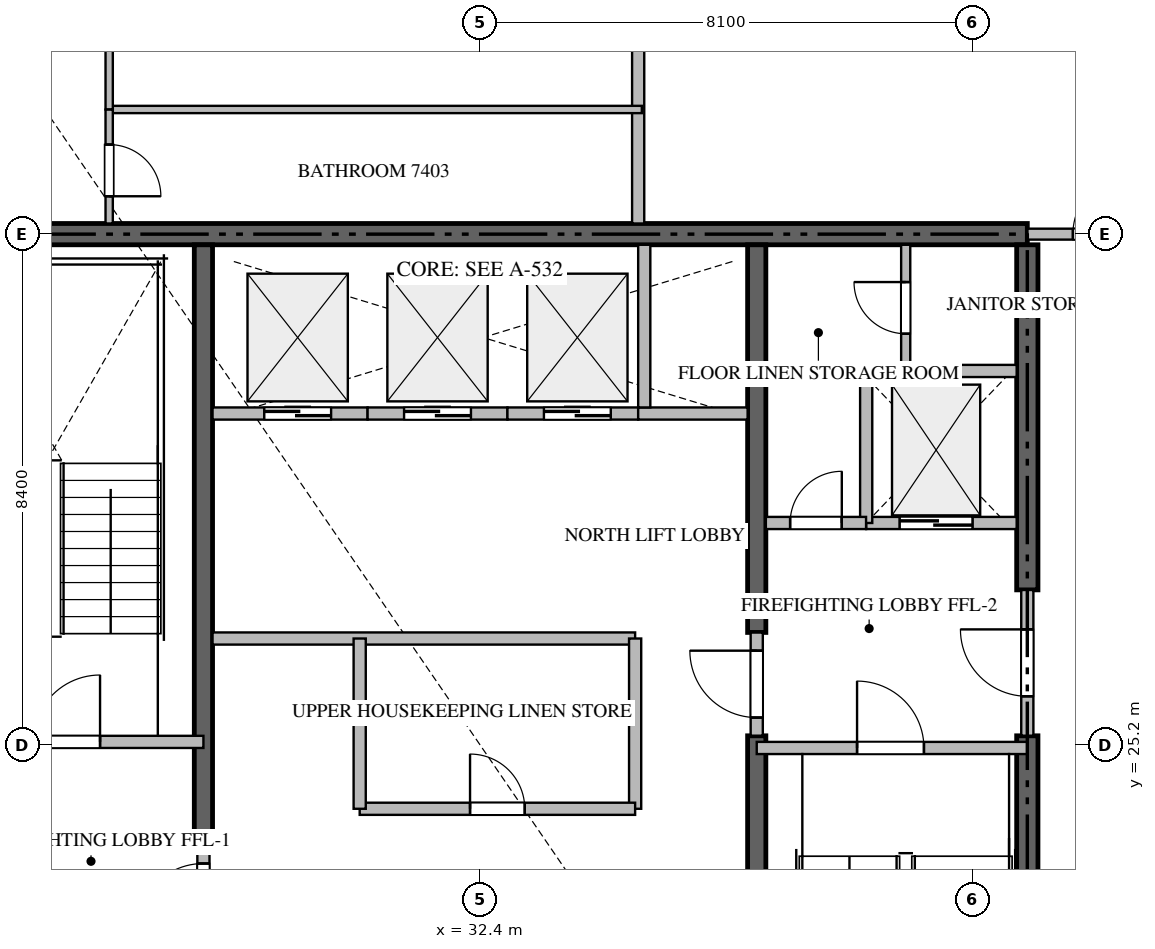
"""IFC4 building model, lengths in metres.
Left out: names, types, materials, properties, quantities, classifications, styles, units other than length and angle.
Written with IfcOpenShell. Run it as: python <this file> out.ifc"""

import sys

from ifc_helpers import new_model, si_unit, direction, frame, frame_2d, origin, place, context, subcontext, project, spatial, rectangle, extrude, source, transform, mapped, element, fill, save


model = new_model("IFC4")
c1 = context("Model", 3, precision=1e-05, world=origin(), true_north=direction((0.0, 1.0)))
c2 = subcontext(c1, "Body", "Model", "MODEL_VIEW")
j1 = project(units=[si_unit("LENGTHUNIT", "METRE"), si_unit("PLANEANGLEUNIT", "RADIAN")], contexts=[c1])
p1 = place(None, origin())
s1 = spatial("IfcSite", under=j1, at=p1, CompositionType="ELEMENT")
p2 = place(p1, origin())
s2 = spatial("IfcBuilding", under=s1, at=p2, CompositionType="ELEMENT")
p3 = place(p2, frame((0.0, 0.0, 297.5)))
s3 = spatial("IfcBuildingStorey", under=s2, at=p3, CompositionType="ELEMENT", Elevation=297.5)
p4 = place(p3, frame((41.4, 33.6, -0.26), z_axis=(0.0, 0.0, 1.0), x_axis=(-1.0, 0.0, 0.0)))
e1 = element("IfcWall", 1, at=p4, inside=s3, PredefinedType="SHEAR", context=c2, shape_type="SweptSolid", body=[
    extrude(rectangle(XDim=18.0, YDim=0.35, at=frame_2d((9.0, 0.0))), origin(), (0.0, 0.0, 1.0), 4.048),
])
p5 = place(p3, frame((41.4, 16.975, -0.26), z_axis=(0.0, 0.0, 1.0), x_axis=(0.0, 1.0, 0.0)))
e2 = element("IfcWall", 2, at=p5, inside=s3, PredefinedType="SHEAR", context=c2, shape_type="SweptSolid", body=[
    extrude(rectangle(XDim=8.375, YDim=0.35, at=frame_2d((4.188, 0.0))), origin(), (0.0, 0.0, 1.0), 4.048),
])
p6 = place(p3, frame((41.4, 27.75, -0.26), z_axis=(0.0, 0.0, 1.0), x_axis=(0.0, 1.0, 0.0)))
e3 = element("IfcWall", 3, at=p6, inside=s3, PredefinedType="SHEAR", context=c2, shape_type="SweptSolid", body=[
    extrude(rectangle(XDim=5.675, YDim=0.35, at=frame_2d((2.837, 0.0))), origin(), (0.0, 0.0, 1.0), 4.048),
])
p7 = place(p3, frame((27.85, 23.55, -0.26), z_axis=(0.0, 0.0, 1.0), x_axis=(0.0, 1.0, 0.0)))
e4 = element("IfcWall", 4, at=p7, inside=s3, PredefinedType="SHEAR", context=c2, shape_type="SweptSolid", body=[
    extrude(rectangle(XDim=9.875, YDim=0.3, at=frame_2d((4.938, 0.0))), origin(), (0.0, 0.0, 1.0), 4.048),
])
p8 = place(p3, frame((36.95, 16.975, -0.26), z_axis=(0.0, 0.0, 1.0), x_axis=(0.0, 1.0, 0.0)))
e5 = element("IfcWall", 5, at=p8, inside=s3, PredefinedType="SHEAR", context=c2, shape_type="SweptSolid", body=[
    extrude(rectangle(XDim=8.375, YDim=0.3, at=frame_2d((4.188, 0.0))), origin(), (0.0, 0.0, 1.0), 4.048),
])
p9 = place(p3, frame((36.95, 27.05, -0.26), z_axis=(0.0, 0.0, 1.0), x_axis=(0.0, 1.0, 0.0)))
e6 = element("IfcWall", 6, at=p9, inside=s3, PredefinedType="SHEAR", context=c2, shape_type="SweptSolid", body=[
    extrude(rectangle(XDim=6.375, YDim=0.3, at=frame_2d((3.188, 0.0))), origin(), (0.0, 0.0, 1.0), 4.048),
])
p10 = place(p3, frame((23.4, 25.25, 0.0), z_axis=(0.0, 0.0, 1.0), x_axis=(1.0, 0.0, 0.0)))
e7 = element("IfcWall", 7, at=p10, inside=s3, PredefinedType="STANDARD", context=c2, shape_type="SweptSolid", body=[
    extrude(rectangle(XDim=4.45, YDim=0.2, at=frame_2d((2.225, 0.0))), origin(), (0.0, 0.0, 1.0), 3.79),
])
p11 = place(p10, frame((1.65, 0.0, 0.0)))
e8 = element("IfcOpeningElement", 8, at=p11, cuts=e7, PredefinedType="OPENING", context=c2, shape_type="SweptSolid", body=[
    extrude(rectangle(XDim=1.1, YDim=2.15, at=frame_2d((0.55, 1.075))), frame((0.0, 0.11, 0.0), z_axis=(0.0, -1.0, 0.0), x_axis=(1.0, 0.0, 0.0)), (0.0, 0.0, 1.0), 0.22),
])
p12 = place(p3, frame((36.95, 25.15, 0.0), z_axis=(0.0, 0.0, 1.0), x_axis=(1.0, 0.0, 0.0)))
e9 = element("IfcWall", 9, at=p12, inside=s3, PredefinedType="STANDARD", context=c2, shape_type="SweptSolid", body=[
    extrude(rectangle(XDim=4.45, YDim=0.2, at=frame_2d((2.225, 0.0))), origin(), (0.0, 0.0, 1.0), 3.79),
])
p13 = place(p12, frame((1.65, 0.0, 0.0)))
e10 = element("IfcOpeningElement", 10, at=p13, cuts=e9, PredefinedType="OPENING", context=c2, shape_type="SweptSolid", body=[
    extrude(rectangle(XDim=1.1, YDim=2.15, at=frame_2d((0.55, 1.075))), frame((0.0, 0.11, 0.0), z_axis=(0.0, -1.0, 0.0), x_axis=(1.0, 0.0, 0.0)), (0.0, 0.0, 1.0), 0.22),
])
p14 = place(p3, frame((38.75, 28.85, 0.0), z_axis=(0.0, 0.0, 1.0), x_axis=(1.0, 0.0, 0.0)))
e11 = element("IfcWall", 11, at=p14, inside=s3, PredefinedType="STANDARD", context=c2, shape_type="SweptSolid", body=[
    extrude(rectangle(XDim=2.475, YDim=0.2, at=frame_2d((1.238, 0.0))), origin(), (0.0, 0.0, 1.0), 3.79),
])
p15 = place(p14, frame((0.55, 0.0, 0.0)))
e12 = element("IfcOpeningElement", 12, at=p15, cuts=e11, PredefinedType="OPENING", context=c2, shape_type="SweptSolid", body=[
    extrude(rectangle(XDim=1.2, YDim=2.2, at=frame_2d((0.6, 1.1))), frame((0.0, 0.11, 0.0), z_axis=(0.0, -1.0, 0.0), x_axis=(1.0, 0.0, 0.0)), (0.0, 0.0, 1.0), 0.22),
])
p16 = place(p3, frame((28.0, 30.65, 0.0), z_axis=(0.0, 0.0, 1.0), x_axis=(1.0, 0.0, 0.0)))
e13 = element("IfcWall", 13, at=p16, inside=s3, PredefinedType="STANDARD", context=c2, shape_type="SweptSolid", body=[
    extrude(rectangle(XDim=2.55, YDim=0.2, at=frame_2d((1.275, 0.0))), origin(), (0.0, 0.0, 1.0), 3.79),
])
p17 = place(p16, frame((0.85, 0.0, 0.0)))
e14 = element("IfcOpeningElement", 14, at=p17, cuts=e13, PredefinedType="OPENING", context=c2, shape_type="SweptSolid", body=[
    extrude(rectangle(XDim=1.1, YDim=2.2, at=frame_2d((0.55, 1.1))), frame((0.0, 0.11, 0.0), z_axis=(0.0, -1.0, 0.0), x_axis=(1.0, 0.0, 0.0)), (0.0, 0.0, 1.0), 0.22),
])
p18 = place(p3, frame((30.55, 30.65, 0.0), z_axis=(0.0, 0.0, 1.0), x_axis=(1.0, 0.0, 0.0)))
e15 = element("IfcWall", 15, at=p18, inside=s3, PredefinedType="STANDARD", context=c2, shape_type="SweptSolid", body=[
    extrude(rectangle(XDim=2.3, YDim=0.2, at=frame_2d((1.15, 0.0))), origin(), (0.0, 0.0, 1.0), 3.79),
])
p19 = place(p18, frame((0.6, 0.0, 0.0)))
e16 = element("IfcOpeningElement", 16, at=p19, cuts=e15, PredefinedType="OPENING", context=c2, shape_type="SweptSolid", body=[
    extrude(rectangle(XDim=1.1, YDim=2.2, at=frame_2d((0.55, 1.1))), frame((0.0, 0.11, 0.0), z_axis=(0.0, -1.0, 0.0), x_axis=(1.0, 0.0, 0.0)), (0.0, 0.0, 1.0), 0.22),
])
p20 = place(p3, frame((32.85, 30.65, 0.0), z_axis=(0.0, 0.0, 1.0), x_axis=(1.0, 0.0, 0.0)))
e17 = element("IfcWall", 17, at=p20, inside=s3, PredefinedType="STANDARD", context=c2, shape_type="SweptSolid", body=[
    extrude(rectangle(XDim=2.15, YDim=0.2, at=frame_2d((1.075, 0.0))), origin(), (0.0, 0.0, 1.0), 3.79),
])
p21 = place(p20, frame((0.6, 0.0, 0.0)))
e18 = element("IfcOpeningElement", 18, at=p21, cuts=e17, PredefinedType="OPENING", context=c2, shape_type="SweptSolid", body=[
    extrude(rectangle(XDim=1.1, YDim=2.2, at=frame_2d((0.55, 1.1))), frame((0.0, 0.11, 0.0), z_axis=(0.0, -1.0, 0.0), x_axis=(1.0, 0.0, 0.0)), (0.0, 0.0, 1.0), 0.22),
])
p22 = place(p3, frame((35.0, 30.65, 0.0), z_axis=(0.0, 0.0, 1.0), x_axis=(1.0, 0.0, 0.0)))
e19 = element("IfcWall", 19, at=p22, inside=s3, PredefinedType="STANDARD", context=c2, shape_type="SweptSolid", body=[
    extrude(rectangle(XDim=1.8, YDim=0.2, at=frame_2d((0.9, 0.0))), origin(), (0.0, 0.0, 1.0), 3.79),
])
p23 = place(p3, frame((35.1, 30.75, 0.0), z_axis=(0.0, 0.0, 1.0), x_axis=(0.0, 1.0, 0.0)))
e20 = element("IfcWall", 20, at=p23, inside=s3, PredefinedType="STANDARD", context=c2, shape_type="SweptSolid", body=[
    extrude(rectangle(XDim=2.675, YDim=0.2, at=frame_2d((1.337, 0.0))), origin(), (0.0, 0.0, 1.0), 3.79),
])
p24 = place(p3, frame((38.75, 28.85, 0.0), z_axis=(0.0, 0.0, 1.0), x_axis=(0.0, 1.0, 0.0)))
e21 = element("IfcWall", 21, at=p24, inside=s3, PredefinedType="STANDARD", context=c2, shape_type="SweptSolid", body=[
    extrude(rectangle(XDim=2.5, YDim=0.2, at=frame_2d((1.25, 0.0))), origin(), (0.0, 0.0, 1.0), 3.79),
])
p25 = place(p3, frame((38.75, 31.35, 0.0), z_axis=(0.0, 0.0, 1.0), x_axis=(1.0, 0.0, 0.0)))
e22 = element("IfcWall", 22, at=p25, inside=s3, PredefinedType="STANDARD", context=c2, shape_type="SweptSolid", body=[
    extrude(rectangle(XDim=2.475, YDim=0.2, at=frame_2d((1.238, 0.0))), origin(), (0.0, 0.0, 1.0), 3.79),
])
p26 = place(p3, frame((37.1, 28.85, 0.0), z_axis=(0.0, 0.0, 1.0), x_axis=(1.0, 0.0, 0.0)))
e23 = element("IfcWall", 23, at=p26, inside=s3, PredefinedType="STANDARD", context=c2, shape_type="SweptSolid", body=[
    extrude(rectangle(XDim=1.648, YDim=0.2, at=frame_2d((0.824, 0.0))), origin(), (0.0, 0.0, 1.0), 3.79),
])
p27 = place(p26, frame((0.399, 0.0, 0.0)))
e24 = element("IfcOpeningElement", 24, at=p27, cuts=e23, PredefinedType="OPENING", context=c2, shape_type="SweptSolid", body=[
    extrude(rectangle(XDim=0.85, YDim=2.1, at=frame_2d((0.425, 1.05))), frame((0.0, 0.11, 0.0), z_axis=(0.0, -1.0, 0.0), x_axis=(1.0, 0.0, 0.0)), (0.0, 0.0, 1.0), 0.22),
])
p28 = place(p3, frame((41.4, 25.352, 0.0), z_axis=(0.0, 0.0, 1.0), x_axis=(0.0, 1.0, 0.0)))
e25 = element("IfcWall", 25, at=p28, inside=s3, PredefinedType="STANDARD", context=c2, shape_type="SweptSolid", body=[
    extrude(rectangle(XDim=2.396, YDim=0.2, at=frame_2d((1.198, 0.0))), origin(), (0.0, 0.0, 1.0), 3.79),
])
p29 = place(p28, frame((0.648, 0.0, 0.0)))
e26 = element("IfcOpeningElement", 26, at=p29, cuts=e25, PredefinedType="OPENING", context=c2, shape_type="SweptSolid", body=[
    extrude(rectangle(XDim=1.1, YDim=2.15, at=frame_2d((0.55, 1.075))), frame((0.0, 0.11, 0.0), z_axis=(0.0, -1.0, 0.0), x_axis=(1.0, 0.0, 0.0)), (0.0, 0.0, 1.0), 0.22),
])
p30 = place(p3, frame((27.85, 21.852, 0.0), z_axis=(0.0, 0.0, 1.0), x_axis=(0.0, 1.0, 0.0)))
e27 = element("IfcWall", 27, at=p30, inside=s3, PredefinedType="STANDARD", context=c2, shape_type="SweptSolid", body=[
    extrude(rectangle(XDim=1.696, YDim=0.2, at=frame_2d((0.848, 0.0))), origin(), (0.0, 0.0, 1.0), 3.79),
])
p31 = place(p30, frame((0.298, 0.0, 0.0)))
e28 = element("IfcOpeningElement", 28, at=p31, cuts=e27, PredefinedType="OPENING", context=c2, shape_type="SweptSolid", body=[
    extrude(rectangle(XDim=1.1, YDim=2.15, at=frame_2d((0.55, 1.075))), frame((0.0, 0.11, 0.0), z_axis=(0.0, -1.0, 0.0), x_axis=(1.0, 0.0, 0.0)), (0.0, 0.0, 1.0), 0.22),
])
p32 = place(p3, frame((36.95, 25.352, 0.0), z_axis=(0.0, 0.0, 1.0), x_axis=(0.0, 1.0, 0.0)))
e29 = element("IfcWall", 29, at=p32, inside=s3, PredefinedType="STANDARD", context=c2, shape_type="SweptSolid", body=[
    extrude(rectangle(XDim=1.696, YDim=0.2, at=frame_2d((0.848, 0.0))), origin(), (0.0, 0.0, 1.0), 3.79),
])
p33 = place(p32, frame((0.298, 0.0, 0.0)))
e30 = element("IfcOpeningElement", 30, at=p33, cuts=e29, PredefinedType="OPENING", context=c2, shape_type="SweptSolid", body=[
    extrude(rectangle(XDim=1.1, YDim=2.15, at=frame_2d((0.55, 1.075))), frame((0.0, 0.11, 0.0), z_axis=(0.0, -1.0, 0.0), x_axis=(1.0, 0.0, 0.0)), (0.0, 0.0, 1.0), 0.22),
])
p34 = place(p3, frame((39.4, 31.35, 0.0), z_axis=(0.0, 0.0, 1.0), x_axis=(0.0, 1.0, 0.0)))
e31 = element("IfcWall", 31, at=p34, inside=s3, PredefinedType="PARTITIONING", context=c2, shape_type="SweptSolid", body=[
    extrude(rectangle(XDim=2.075, YDim=0.15, at=frame_2d((1.038, 0.0))), origin(), (0.0, 0.0, 1.0), 3.79),
])
p35 = place(p34, frame((0.612, 0.0, 0.0)))
e32 = element("IfcOpeningElement", 32, at=p35, cuts=e31, PredefinedType="OPENING", context=c2, shape_type="SweptSolid", body=[
    extrude(rectangle(XDim=0.85, YDim=2.1, at=frame_2d((0.425, 1.05))), frame((0.0, 0.085, 0.0), z_axis=(0.0, -1.0, 0.0), x_axis=(1.0, 0.0, 0.0)), (0.0, 0.0, 1.0), 0.17),
])
p36 = place(p3, frame((28.0, 26.95, 0.0), z_axis=(0.0, 0.0, 1.0), x_axis=(1.0, 0.0, 0.0)))
e33 = element("IfcWall", 33, at=p36, inside=s3, PredefinedType="STANDARD", context=c2, shape_type="SweptSolid", body=[
    extrude(rectangle(XDim=6.95, YDim=0.2, at=frame_2d((3.475, 0.0))), origin(), (0.0, 0.0, 1.0), 3.79),
])
p37 = place(p3, frame((34.95, 24.15, 0.0), z_axis=(0.0, 0.0, 1.0), x_axis=(0.0, 1.0, 0.0)))
e34 = element("IfcWall", 34, at=p37, inside=s3, PredefinedType="STANDARD", context=c2, shape_type="SweptSolid", body=[
    extrude(rectangle(XDim=2.8, YDim=0.2, at=frame_2d((1.4, 0.0))), origin(), (0.0, 0.0, 1.0), 3.79),
])
p38 = place(p3, frame((30.42, 24.15, 0.0), z_axis=(0.0, 0.0, 1.0), x_axis=(1.0, 0.0, 0.0)))
e35 = element("IfcWall", 35, at=p38, inside=s3, PredefinedType="STANDARD", context=c2, shape_type="SweptSolid", body=[
    extrude(rectangle(XDim=4.53, YDim=0.2, at=frame_2d((2.265, 0.0))), origin(), (0.0, 0.0, 1.0), 3.79),
])
p39 = place(p38, frame((1.815, 0.0, 0.0)))
e36 = element("IfcOpeningElement", 36, at=p39, cuts=e35, PredefinedType="OPENING", context=c2, shape_type="SweptSolid", body=[
    extrude(rectangle(XDim=0.9, YDim=2.1, at=frame_2d((0.45, 1.05))), frame((0.0, 0.11, 0.0), z_axis=(0.0, -1.0, 0.0), x_axis=(1.0, 0.0, 0.0)), (0.0, 0.0, 1.0), 0.22),
])
p40 = place(p3, frame((30.42, 24.15, 0.0), z_axis=(0.0, 0.0, 1.0), x_axis=(0.0, 1.0, 0.0)))
e37 = element("IfcWall", 37, at=p40, inside=s3, PredefinedType="STANDARD", context=c2, shape_type="SweptSolid", body=[
    extrude(rectangle(XDim=2.8, YDim=0.2, at=frame_2d((1.4, 0.0))), origin(), (0.0, 0.0, 1.0), 3.79),
])
p41 = place(p3, frame((35.0, 33.775, 0.0), z_axis=(0.0, 0.0, 1.0), x_axis=(0.0, 1.0, 0.0)))
e38 = element("IfcWall", 38, at=p41, inside=s3, PredefinedType="PARTITIONING", context=c2, shape_type="SweptSolid", body=[
    extrude(rectangle(XDim=14.143, YDim=0.2, at=frame_2d((7.072, 0.0))), origin(), (0.0, 0.0, 1.0), 3.79),
])
p42 = place(p3, frame((41.402, 33.6, 0.0), z_axis=(0.0, 0.0, 1.0), x_axis=(1.0, 0.0, 0.0)))
e39 = element("IfcWall", 39, at=p42, inside=s3, PredefinedType="PARTITIONING", context=c2, shape_type="SweptSolid", body=[
    extrude(rectangle(XDim=2.496, YDim=0.18, at=frame_2d((1.248, 0.0))), origin(), (0.0, 0.0, 1.0), 3.79),
])
p43 = place(p42, frame((0.748, 0.0, 0.0)))
e40 = element("IfcOpeningElement", 40, at=p43, cuts=e39, PredefinedType="OPENING", context=c2, shape_type="SweptSolid", body=[
    extrude(rectangle(XDim=1.0, YDim=2.15, at=frame_2d((0.5, 1.075))), frame((0.0, 0.1, 0.0), z_axis=(0.0, -1.0, 0.0), x_axis=(1.0, 0.0, 0.0)), (0.0, 0.0, 1.0), 0.2),
])
p44 = place(p3, frame((26.3, 35.65, 0.0), z_axis=(0.0, 0.0, 1.0), x_axis=(1.0, 0.0, 0.0)))
e41 = element("IfcWall", 41, at=p44, inside=s3, PredefinedType="PARTITIONING", context=c2, shape_type="SweptSolid", body=[
    extrude(rectangle(XDim=8.76, YDim=0.12, at=frame_2d((4.38, 0.0))), origin(), (0.0, 0.0, 1.0), 3.79),
])
p45 = place(p3, frame((26.3, 44.036, 0.0), z_axis=(0.0, 0.0, 1.0), x_axis=(0.0, -1.0, 0.0)))
e42 = element("IfcWall", 42, at=p45, inside=s3, PredefinedType="PARTITIONING", context=c2, shape_type="SweptSolid", body=[
    extrude(rectangle(XDim=8.386, YDim=0.12, at=frame_2d((4.193, 0.0))), origin(), (0.0, 0.0, 1.0), 3.79),
])
p46 = place(p45, frame((3.768, 0.0, 0.0)))
e43 = element("IfcOpeningElement", 43, at=p46, cuts=e42, PredefinedType="OPENING", context=c2, shape_type="SweptSolid", body=[
    extrude(rectangle(XDim=0.85, YDim=2.1, at=frame_2d((0.425, 1.05))), frame((0.0, 0.07, 0.0), z_axis=(0.0, -1.0, 0.0), x_axis=(1.0, 0.0, 0.0)), (0.0, 0.0, 1.0), 0.14),
])
p47 = place(p3, frame((26.3, 35.648, 0.0), z_axis=(0.0, 0.0, 1.0), x_axis=(0.0, -1.0, 0.0)))
e44 = element("IfcWall", 44, at=p47, inside=s3, PredefinedType="PARTITIONING", context=c2, shape_type="SweptSolid", body=[
    extrude(rectangle(XDim=1.873, YDim=0.12, at=frame_2d((0.937, 0.0))), origin(), (0.0, 0.0, 1.0), 3.79),
])
p48 = place(p47, frame((0.575, 0.0, 0.0)))
e45 = element("IfcOpeningElement", 45, at=p48, cuts=e44, PredefinedType="OPENING", context=c2, shape_type="SweptSolid", body=[
    extrude(rectangle(XDim=0.85, YDim=2.1, at=frame_2d((0.425, 1.05))), frame((0.0, 0.07, 0.0), z_axis=(0.0, -1.0, 0.0), x_axis=(1.0, 0.0, 0.0)), (0.0, 0.0, 1.0), 0.14),
])
m1 = source(origin(), c2, "Body", "SweptSolid", [
    extrude(rectangle(XDim=1.1, YDim=2.15, at=frame_2d((0.55, 1.075))), frame((0.0, 0.025, 0.0), z_axis=(0.0, -1.0, 0.0), x_axis=(1.0, 0.0, 0.0)), (0.0, 0.0, 1.0), 0.05),
])
p49 = place(p11, origin())
e46 = element("IfcDoor", 46, at=p49, inside=s3, OperationType="SINGLE_SWING_RIGHT", PredefinedType="DOOR", context=c2, shape_type="MappedRepresentation", body=[
    mapped(m1, transform((0.0, 0.0, 0.0), scale=1.0)),
])
fill(e8, e46)
p50 = place(p13, origin())
e47 = element("IfcDoor", 47, at=p50, inside=s3, OperationType="SINGLE_SWING_LEFT", PredefinedType="DOOR", context=c2, shape_type="MappedRepresentation", body=[
    mapped(m1, transform((0.0, 0.0, 0.0), scale=1.0)),
])
fill(e10, e47)
m2 = source(origin(), c2, "Body", "SweptSolid", [
    extrude(rectangle(XDim=1.2, YDim=2.2, at=frame_2d((0.6, 1.1))), frame((0.0, 0.025, 0.0), z_axis=(0.0, -1.0, 0.0), x_axis=(1.0, 0.0, 0.0)), (0.0, 0.0, 1.0), 0.05),
])
p51 = place(p15, origin())
e48 = element("IfcDoor", 48, at=p51, inside=s3, OperationType="DOUBLE_DOOR_SLIDING", PredefinedType="DOOR", context=c2, shape_type="MappedRepresentation", body=[
    mapped(m2, transform((0.0, 0.0, 0.0), scale=1.0)),
])
fill(e12, e48)
m3 = source(origin(), c2, "Body", "SweptSolid", [
    extrude(rectangle(XDim=1.1, YDim=2.2, at=frame_2d((0.55, 1.1))), frame((0.0, 0.025, 0.0), z_axis=(0.0, -1.0, 0.0), x_axis=(1.0, 0.0, 0.0)), (0.0, 0.0, 1.0), 0.05),
])
p52 = place(p17, origin())
e49 = element("IfcDoor", 49, at=p52, inside=s3, OperationType="DOUBLE_DOOR_SLIDING", PredefinedType="DOOR", context=c2, shape_type="MappedRepresentation", body=[
    mapped(m3, transform((0.0, 0.0, 0.0), scale=1.0)),
])
fill(e14, e49)
p53 = place(p19, origin())
e50 = element("IfcDoor", 50, at=p53, inside=s3, OperationType="DOUBLE_DOOR_SLIDING", PredefinedType="DOOR", context=c2, shape_type="MappedRepresentation", body=[
    mapped(m3, transform((0.0, 0.0, 0.0), scale=1.0)),
])
fill(e16, e50)
p54 = place(p21, origin())
e51 = element("IfcDoor", 51, at=p54, inside=s3, OperationType="DOUBLE_DOOR_SLIDING", PredefinedType="DOOR", context=c2, shape_type="MappedRepresentation", body=[
    mapped(m3, transform((0.0, 0.0, 0.0), scale=1.0)),
])
fill(e18, e51)
m4 = source(origin(), c2, "Body", "SweptSolid", [
    extrude(rectangle(XDim=0.85, YDim=2.1, at=frame_2d((0.425, 1.05))), frame((0.0, 0.025, 0.0), z_axis=(0.0, -1.0, 0.0), x_axis=(1.0, 0.0, 0.0)), (0.0, 0.0, 1.0), 0.05),
])
p55 = place(p27, origin())
e52 = element("IfcDoor", 52, at=p55, inside=s3, OperationType="SINGLE_SWING_RIGHT", PredefinedType="DOOR", context=c2, shape_type="MappedRepresentation", body=[
    mapped(m4, transform((0.0, 0.0, 0.0), scale=1.0)),
])
fill(e24, e52)
p56 = place(p29, origin())
e53 = element("IfcDoor", 53, at=p56, inside=s3, OperationType="SINGLE_SWING_RIGHT", PredefinedType="DOOR", context=c2, shape_type="MappedRepresentation", body=[
    mapped(m1, transform((0.0, 0.0, 0.0), scale=1.0)),
])
fill(e26, e53)
p57 = place(p31, origin())
e54 = element("IfcDoor", 54, at=p57, inside=s3, OperationType="SINGLE_SWING_LEFT", PredefinedType="DOOR", context=c2, shape_type="MappedRepresentation", body=[
    mapped(m1, transform((0.0, 0.0, 0.0), scale=1.0)),
])
fill(e28, e54)
p58 = place(p33, origin())
e55 = element("IfcDoor", 55, at=p58, inside=s3, OperationType="SINGLE_SWING_RIGHT", PredefinedType="DOOR", context=c2, shape_type="MappedRepresentation", body=[
    mapped(m1, transform((0.0, 0.0, 0.0), scale=1.0)),
])
fill(e30, e55)
p59 = place(p35, origin())
e56 = element("IfcDoor", 56, at=p59, inside=s3, OperationType="SINGLE_SWING_RIGHT", PredefinedType="DOOR", context=c2, shape_type="MappedRepresentation", body=[
    mapped(m4, transform((0.0, 0.0, 0.0), scale=1.0)),
])
fill(e32, e56)
m5 = source(origin(), c2, "Body", "SweptSolid", [
    extrude(rectangle(XDim=0.9, YDim=2.1, at=frame_2d((0.45, 1.05))), frame((0.0, 0.025, 0.0), z_axis=(0.0, -1.0, 0.0), x_axis=(1.0, 0.0, 0.0)), (0.0, 0.0, 1.0), 0.05),
])
p60 = place(p39, origin())
e57 = element("IfcDoor", 57, at=p60, inside=s3, OperationType="SINGLE_SWING_LEFT", PredefinedType="DOOR", context=c2, shape_type="MappedRepresentation", body=[
    mapped(m5, transform((0.0, 0.0, 0.0), scale=1.0)),
])
fill(e36, e57)
m6 = source(origin(), c2, "Body", "SweptSolid", [
    extrude(rectangle(XDim=1.0, YDim=2.15, at=frame_2d((0.5, 1.075))), frame((0.0, 0.025, 0.0), z_axis=(0.0, -1.0, 0.0), x_axis=(1.0, 0.0, 0.0)), (0.0, 0.0, 1.0), 0.05),
])
p61 = place(p43, origin())
e58 = element("IfcDoor", 58, at=p61, inside=s3, OperationType="SINGLE_SWING_RIGHT", PredefinedType="DOOR", context=c2, shape_type="MappedRepresentation", body=[
    mapped(m6, transform((0.0, 0.0, 0.0), scale=1.0)),
])
fill(e40, e58)
p62 = place(p48, origin())
e59 = element("IfcDoor", 59, at=p62, inside=s3, OperationType="SINGLE_SWING_RIGHT", PredefinedType="DOOR", context=c2, shape_type="MappedRepresentation", body=[
    mapped(m4, transform((0.0, 0.0, 0.0), scale=1.0)),
])
fill(e45, e59)
save(model, sys.argv[1])
